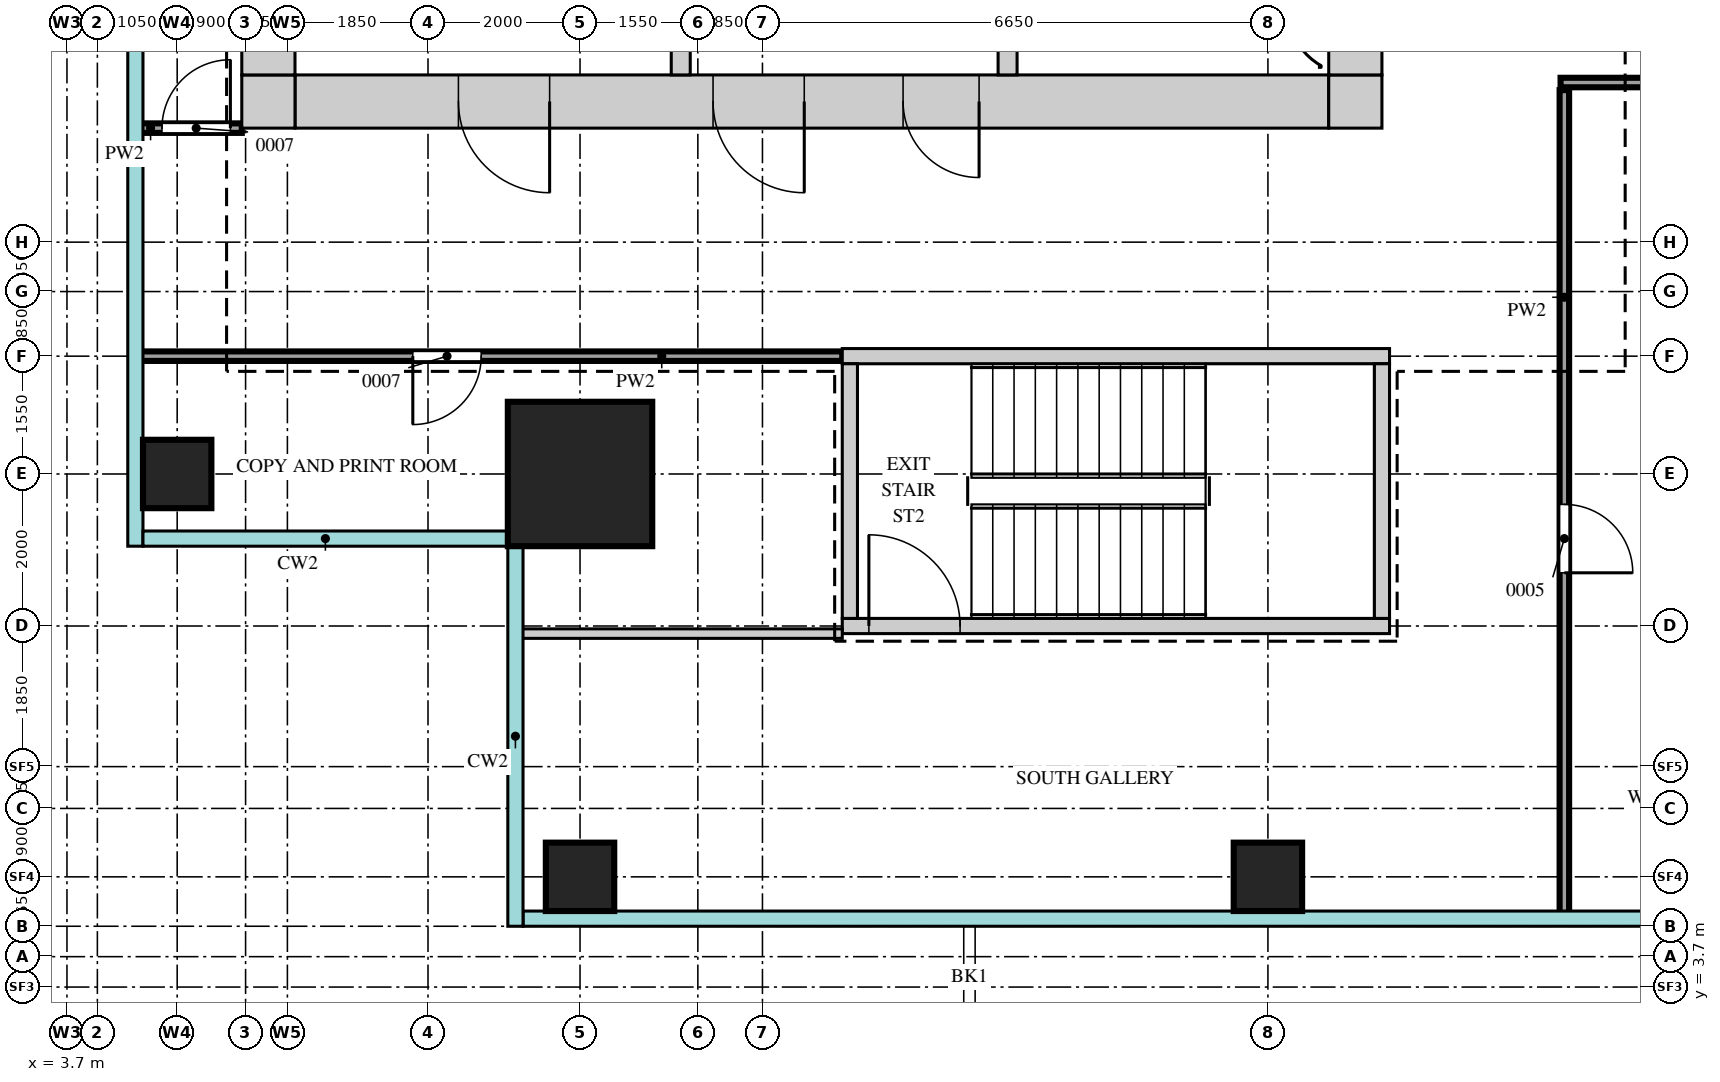
"""IFC4 building model, lengths in metres.
Left out: names, types, materials, properties, quantities, classifications, styles, units other than length and angle.
Written with IfcOpenShell. Run it as: python <this file> out.ifc"""

import sys

from ifc_helpers import new_model, si_unit, direction, frame, frame_2d, origin, origin_2d, place, context, subcontext, project, spatial, rectangle, extrude, source, transform, mapped, element, fill, save


model = new_model("IFC4")
c1 = context("Model", 3, precision=1e-05, world=origin(), true_north=direction((0.0, 1.0)))
c2 = subcontext(c1, "Body", "Model", "MODEL_VIEW")
j1 = project(units=[si_unit("LENGTHUNIT", "METRE"), si_unit("PLANEANGLEUNIT", "RADIAN")], contexts=[c1])
p1 = place(None, origin())
s1 = spatial("IfcSite", under=j1, at=p1, CompositionType="ELEMENT")
p2 = place(p1, origin())
s2 = spatial("IfcBuilding", under=s1, at=p2, CompositionType="ELEMENT")
p3 = place(p2, frame((0.0, 0.0, 230.2)))
s3 = spatial("IfcBuildingStorey", under=s2, at=p3, CompositionType="ELEMENT", Elevation=230.2)
m1 = source(origin(), c2, "Body", "SweptSolid", [
    extrude(rectangle(XDim=13.6, YDim=0.7, at=frame_2d((6.8, 0.0))), origin(), (0.0, 0.0, 1.0), 3.75),
])
p4 = place(p3, frame((6.7, 15.35, 0.0), z_axis=(0.0, 0.0, 1.0), x_axis=(1.0, 0.0, 0.0)))
e1 = element("IfcWall", 1, at=p4, inside=s3, PredefinedType="SHEAR", context=c2, shape_type="MappedRepresentation", body=[
    mapped(m1, transform((0.0, 0.0, 0.0))),
])
m2 = source(origin(), c2, "Body", "SweptSolid", [
    extrude(rectangle(XDim=1.2, YDim=2.1, at=frame_2d((0.6, 1.05))), frame((0.0, 0.36, 0.0), z_axis=(0.0, -1.0, 0.0), x_axis=(1.0, 0.0, 0.0)), (0.0, 0.0, 1.0), 0.72),
])
p5 = place(p4, frame((5.5, 0.0, 0.0)))
e2 = element("IfcOpeningElement", 2, at=p5, cuts=e1, PredefinedType="OPENING", context=c2, shape_type="MappedRepresentation", body=[
    mapped(m2, transform((0.0, 0.0, 0.0))),
])
p6 = place(p4, frame((2.15, 0.0, 0.0)))
e3 = element("IfcOpeningElement", 3, at=p6, cuts=e1, PredefinedType="OPENING", context=c2, shape_type="MappedRepresentation", body=[
    mapped(m2, transform((0.0, 0.0, 0.0))),
])
m3 = source(origin(), c2, "Body", "SweptSolid", [
    extrude(rectangle(XDim=1.0, YDim=2.1, at=frame_2d((0.5, 1.05))), frame((0.0, 0.36, 0.0), z_axis=(0.0, -1.0, 0.0), x_axis=(1.0, 0.0, 0.0)), (0.0, 0.0, 1.0), 0.72),
])
p7 = place(p4, frame((8.0, 0.0, 0.0)))
e4 = element("IfcOpeningElement", 4, at=p7, cuts=e1, PredefinedType="OPENING", context=c2, shape_type="MappedRepresentation", body=[
    mapped(m3, transform((0.0, 0.0, 0.0))),
])
m4 = source(origin(), c2, "Body", "SweptSolid", [
    extrude(rectangle(XDim=0.7, YDim=0.7, at=frame_2d((0.35, 0.0))), origin(), (0.0, 0.0, 1.0), 3.75),
])
for number, where, z_axis, x_axis in (
    (5, (20.3, 15.35, 0.0), (0.0, 0.0, 1.0), (1.0, 0.0, 0.0)),
    (6, (6.0, 15.35, 0.0), (0.0, 0.0, 1.0), (1.0, 0.0, 0.0)),
):
    element("IfcWall", number, at=place(p3, frame(where, z_axis=z_axis, x_axis=x_axis)), inside=s3, PredefinedType="SHEAR", context=c2, shape_type="MappedRepresentation", body=[
        mapped(m4, transform((0.0, 0.0, 0.0))),
    ])
m5 = source(origin(), c2, "Body", "SweptSolid", [
    extrude(rectangle(XDim=22.6, YDim=0.7, at=frame_2d((11.3, 0.0))), origin(), (0.0, 0.0, 1.0), 3.75),
])
p8 = place(p3, frame((20.65, 15.7, 0.0), z_axis=(0.0, 0.0, 1.0), x_axis=(0.0, 1.0, 0.0)))
e7 = element("IfcWall", 7, at=p8, inside=s3, PredefinedType="SHEAR", context=c2, shape_type="MappedRepresentation", body=[
    mapped(m5, transform((0.0, 0.0, 0.0))),
])
m6 = source(origin(), c2, "Body", "SweptSolid", [
    extrude(rectangle(XDim=1.8, YDim=2.1, at=frame_2d((0.9, 1.05))), frame((0.0, 0.36, 0.0), z_axis=(0.0, -1.0, 0.0), x_axis=(1.0, 0.0, 0.0)), (0.0, 0.0, 1.0), 0.72),
])
p9 = place(p8, frame((10.8, 0.0, 0.0)))
e8 = element("IfcOpeningElement", 8, at=p9, cuts=e7, PredefinedType="OPENING", context=c2, shape_type="MappedRepresentation", body=[
    mapped(m6, transform((0.0, 0.0, 0.0))),
])
m7 = source(origin(), c2, "Body", "SweptSolid", [
    extrude(rectangle(XDim=0.9, YDim=2.1, at=frame_2d((0.45, 1.05))), frame((0.0, 0.36, 0.0), z_axis=(0.0, -1.0, 0.0), x_axis=(1.0, 0.0, 0.0)), (0.0, 0.0, 1.0), 0.72),
])
p10 = place(p8, frame((0.45, 0.0, 0.0)))
e9 = element("IfcOpeningElement", 9, at=p10, cuts=e7, PredefinedType="OPENING", context=c2, shape_type="MappedRepresentation", body=[
    mapped(m7, transform((0.0, 0.0, 0.0))),
])
p11 = place(p8, frame((2.9, 0.0, 0.0)))
e10 = element("IfcOpeningElement", 10, at=p11, cuts=e7, PredefinedType="OPENING", context=c2, shape_type="MappedRepresentation", body=[
    mapped(m7, transform((0.0, 0.0, 0.0))),
])
p12 = place(p8, frame((5.65, 0.0, 0.0)))
e11 = element("IfcOpeningElement", 11, at=p12, cuts=e7, PredefinedType="OPENING", context=c2, shape_type="MappedRepresentation", body=[
    mapped(m7, transform((0.0, 0.0, 0.0))),
])
p13 = place(p3, frame((6.35, 15.7, 0.0), z_axis=(0.0, 0.0, 1.0), x_axis=(0.0, 1.0, 0.0)))
e12 = element("IfcWall", 12, at=p13, inside=s3, PredefinedType="SHEAR", context=c2, shape_type="MappedRepresentation", body=[
    mapped(m5, transform((0.0, 0.0, 0.0))),
])
m8 = source(origin(), c2, "Body", "SweptSolid", [
    extrude(rectangle(XDim=7.2, YDim=0.2, at=frame_2d((3.6, 0.0))), origin(), (0.0, 0.0, 1.0), 3.75),
])
p14 = place(p3, frame((13.9, 12.0, 0.0), z_axis=(0.0, 0.0, 1.0), x_axis=(1.0, 0.0, 0.0)))
e13 = element("IfcWall", 13, at=p14, inside=s3, PredefinedType="SHEAR", context=c2, shape_type="MappedRepresentation", body=[
    mapped(m8, transform((0.0, 0.0, 0.0))),
])
p15 = place(p3, frame((13.9, 8.45, 0.0), z_axis=(0.0, 0.0, 1.0), x_axis=(1.0, 0.0, 0.0)))
e14 = element("IfcWall", 14, at=p15, inside=s3, PredefinedType="SHEAR", context=c2, shape_type="MappedRepresentation", body=[
    mapped(m8, transform((0.0, 0.0, 0.0))),
])
m9 = source(origin(), c2, "Body", "SweptSolid", [
    extrude(rectangle(XDim=1.2, YDim=2.1, at=frame_2d((0.6, 1.05))), frame((0.0, 0.11, 0.0), z_axis=(0.0, -1.0, 0.0), x_axis=(1.0, 0.0, 0.0)), (0.0, 0.0, 1.0), 0.22),
])
p16 = place(p15, frame((0.35, 0.0, 0.0)))
e15 = element("IfcOpeningElement", 15, at=p16, cuts=e14, PredefinedType="OPENING", context=c2, shape_type="MappedRepresentation", body=[
    mapped(m9, transform((0.0, 0.0, 0.0))),
])
m10 = source(origin(), c2, "Body", "SweptSolid", [
    extrude(rectangle(XDim=3.35, YDim=0.2, at=frame_2d((1.675, 0.0))), origin(), (0.0, 0.0, 1.0), 3.75),
])
for number, where, z_axis, x_axis in (
    (16, (21.0, 8.55, 0.0), (0.0, 0.0, 1.0), (0.0, 1.0, 0.0)),
    (17, (14.0, 8.55, 0.0), (0.0, 0.0, 1.0), (0.0, 1.0, 0.0)),
):
    element("IfcWall", number, at=place(p3, frame(where, z_axis=z_axis, x_axis=x_axis)), inside=s3, PredefinedType="SHEAR", context=c2, shape_type="MappedRepresentation", body=[
        mapped(m10, transform((0.0, 0.0, 0.0))),
    ])
m11 = source(origin(), c2, "Body", "SweptSolid", [
    extrude(rectangle(XDim=3.5, YDim=0.25, at=frame_2d((1.75, 0.0))), origin(), (0.0, 0.0, 1.0), 3.75),
])
for number, where, z_axis, x_axis in (
    (18, (16.075, 15.7, 0.0), (0.0, 0.0, 1.0), (0.0, 1.0, 0.0)),
    (19, (11.775, 15.7, 0.0), (0.0, 0.0, 1.0), (0.0, 1.0, 0.0)),
):
    element("IfcWall", number, at=place(p3, frame(where, z_axis=z_axis, x_axis=x_axis)), inside=s3, PredefinedType="STANDARD", context=c2, shape_type="MappedRepresentation", body=[
        mapped(m11, transform((0.0, 0.0, 0.0))),
    ])
m12 = source(origin(), c2, "Body", "SweptSolid", [
    extrude(rectangle(XDim=1.9, YDim=1.9, at=origin_2d()), origin(), (0.0, 0.0, 1.0), 4.0),
])
p17 = place(p3, frame((10.45, 10.45, 0.0), z_axis=(0.0, 0.0, 1.0), x_axis=(1.0, 0.0, 0.0)))
e20 = element("IfcColumn", 20, at=p17, inside=s3, PredefinedType="COLUMN", context=c2, shape_type="MappedRepresentation", body=[
    mapped(m12, transform((0.0, 0.0, 0.0))),
])
m13 = source(origin(), c2, "Body", "SweptSolid", [
    extrude(rectangle(XDim=0.9, YDim=0.9, at=origin_2d()), origin(), (0.0, 0.0, 1.0), 3.75),
])
for number, where, z_axis, x_axis in (
    (21, (10.45, 5.15, 0.0), (0.0, 0.0, 1.0), (1.0, 0.0, 0.0)),
    (22, (19.5, 5.15, 0.0), (0.0, 0.0, 1.0), (1.0, 0.0, 0.0)),
    (23, (5.15, 10.45, 0.0), (0.0, 0.0, 1.0), (1.0, 0.0, 0.0)),
):
    element("IfcColumn", number, at=place(p3, frame(where, z_axis=z_axis, x_axis=x_axis)), inside=s3, PredefinedType="COLUMN", context=c2, shape_type="MappedRepresentation", body=[
        mapped(m13, transform((0.0, 0.0, 0.0))),
    ])
m14 = source(origin(), c2, "Body", "SweptSolid", [
    extrude(rectangle(XDim=10.85, YDim=0.125, at=frame_2d((5.425, 0.0))), origin(), (0.0, 0.0, 1.0), 3.8),
])
p18 = place(p3, frame((23.4, 4.65, 0.0), z_axis=(0.0, 0.0, 1.0), x_axis=(0.0, 1.0, 0.0)))
e24 = element("IfcWall", 24, at=p18, inside=s3, PredefinedType="PARTITIONING", context=c2, shape_type="MappedRepresentation", body=[
    mapped(m14, transform((0.0, 0.0, 0.0))),
])
m15 = source(origin(), c2, "Body", "SweptSolid", [
    extrude(rectangle(XDim=0.9, YDim=2.1, at=frame_2d((0.45, 1.05))), frame((0.0, 0.073, 0.0), z_axis=(0.0, -1.0, 0.0), x_axis=(1.0, 0.0, 0.0)), (0.0, 0.0, 1.0), 0.145),
])
p19 = place(p18, frame((4.5, 0.0, 0.0)))
e25 = element("IfcOpeningElement", 25, at=p19, cuts=e24, PredefinedType="OPENING", context=c2, shape_type="MappedRepresentation", body=[
    mapped(m15, transform((0.0, 0.0, 0.0))),
])
m16 = source(origin(), c2, "Body", "SweptSolid", [
    extrude(rectangle(XDim=4.25, YDim=0.125, at=frame_2d((2.125, 0.0))), origin(), (0.0, 0.0, 1.0), 3.8),
])
p20 = place(p3, frame((9.65, 8.35, 0.0), z_axis=(0.0, 0.0, 1.0), x_axis=(1.0, 0.0, 0.0)))
e26 = element("IfcWall", 26, at=p20, inside=s3, PredefinedType="PARTITIONING", context=c2, shape_type="MappedRepresentation", body=[
    mapped(m16, transform((0.0, 0.0, 0.0))),
])
m17 = source(origin(), c2, "Body", "SweptSolid", [
    extrude(rectangle(XDim=9.25, YDim=0.125, at=frame_2d((4.625, 0.0))), origin(), (0.0, 0.0, 1.0), 3.8),
])
p21 = place(p3, frame((4.65, 12.0, 0.0), z_axis=(0.0, 0.0, 1.0), x_axis=(1.0, 0.0, 0.0)))
e27 = element("IfcWall", 27, at=p21, inside=s3, PredefinedType="PARTITIONING", context=c2, shape_type="MappedRepresentation", body=[
    mapped(m17, transform((0.0, 0.0, 0.0))),
])
p22 = place(p21, frame((3.6, 0.0, 0.0)))
e28 = element("IfcOpeningElement", 28, at=p22, cuts=e27, PredefinedType="OPENING", context=c2, shape_type="MappedRepresentation", body=[
    mapped(m15, transform((0.0, 0.0, 0.0))),
])
m18 = source(origin(), c2, "Body", "SweptSolid", [
    extrude(rectangle(XDim=1.35, YDim=0.125, at=frame_2d((0.675, 0.0))), origin(), (0.0, 0.0, 1.0), 3.8),
])
p23 = place(p3, frame((4.65, 15.0, 0.0), z_axis=(0.0, 0.0, 1.0), x_axis=(1.0, 0.0, 0.0)))
e29 = element("IfcWall", 29, at=p23, inside=s3, PredefinedType="PARTITIONING", context=c2, shape_type="MappedRepresentation", body=[
    mapped(m18, transform((0.0, 0.0, 0.0))),
])
p24 = place(p23, frame((0.3, 0.0, 0.0)))
e30 = element("IfcOpeningElement", 30, at=p24, cuts=e29, PredefinedType="OPENING", context=c2, shape_type="MappedRepresentation", body=[
    mapped(m15, transform((0.0, 0.0, 0.0))),
])
m19 = source(origin(), c2, "Body", "SweptSolid", [
    extrude(rectangle(XDim=26.0, YDim=0.125, at=frame_2d((13.0, 0.0))), origin(), (0.0, 0.0, 1.0), 3.8),
])
p25 = place(p3, frame((23.35, 15.6, 0.0), z_axis=(0.0, 0.0, 1.0), x_axis=(1.0, 0.0, 0.0)))
e31 = element("IfcWall", 31, at=p25, inside=s3, PredefinedType="PARTITIONING", context=c2, shape_type="MappedRepresentation", body=[
    mapped(m19, transform((0.0, 0.0, 0.0))),
])
p26 = place(p25, frame((4.05, 0.0, 0.0)))
e32 = element("IfcOpeningElement", 32, at=p26, cuts=e31, PredefinedType="OPENING", context=c2, shape_type="MappedRepresentation", body=[
    mapped(m15, transform((0.0, 0.0, 0.0))),
])
m20 = source(origin(), c2, "Body", "SweptSolid", [
    extrude(rectangle(XDim=1.0, YDim=2.1, at=frame_2d((0.5, 1.05))), frame((0.0, 0.073, 0.0), z_axis=(0.0, -1.0, 0.0), x_axis=(1.0, 0.0, 0.0)), (0.0, 0.0, 1.0), 0.145),
])
p27 = place(p25, frame((6.85, 0.0, 0.0)))
e33 = element("IfcOpeningElement", 33, at=p27, cuts=e31, PredefinedType="OPENING", context=c2, shape_type="MappedRepresentation", body=[
    mapped(m20, transform((0.0, 0.0, 0.0))),
])
p28 = place(p25, frame((9.25, 0.0, 0.0)))
e34 = element("IfcOpeningElement", 34, at=p28, cuts=e31, PredefinedType="OPENING", context=c2, shape_type="MappedRepresentation", body=[
    mapped(m15, transform((0.0, 0.0, 0.0))),
])
p29 = place(p25, frame((15.1, 0.0, 0.0)))
e35 = element("IfcOpeningElement", 35, at=p29, cuts=e31, PredefinedType="OPENING", context=c2, shape_type="MappedRepresentation", body=[
    mapped(m15, transform((0.0, 0.0, 0.0))),
])
p30 = place(p25, frame((22.6, 0.0, 0.0)))
e36 = element("IfcOpeningElement", 36, at=p30, cuts=e31, PredefinedType="OPENING", context=c2, shape_type="MappedRepresentation", body=[
    mapped(m15, transform((0.0, 0.0, 0.0))),
])
m21 = source(origin(), c2, "Body", "SweptSolid", [
    extrude(rectangle(XDim=1.2, YDim=2.1, at=frame_2d((0.6, 1.05))), frame((0.0, 0.3, 0.0), z_axis=(0.0, -1.0, 0.0), x_axis=(1.0, 0.0, 0.0)), (0.0, 0.0, 1.0), 0.6),
])
p31 = place(p5, origin())
e37 = element("IfcDoor", 37, at=p31, inside=s3, OperationType="SINGLE_SWING_RIGHT", PredefinedType="DOOR", context=c2, shape_type="MappedRepresentation", body=[
    mapped(m21, transform((0.0, 0.0, 0.0))),
])
fill(e2, e37)
p32 = place(p6, origin())
e38 = element("IfcDoor", 38, at=p32, inside=s3, OperationType="SINGLE_SWING_RIGHT", PredefinedType="DOOR", context=c2, shape_type="MappedRepresentation", body=[
    mapped(m21, transform((0.0, 0.0, 0.0))),
])
fill(e3, e38)
m22 = source(origin(), c2, "Body", "SweptSolid", [
    extrude(rectangle(XDim=1.0, YDim=2.1, at=frame_2d((0.5, 1.05))), frame((0.0, 0.3, 0.0), z_axis=(0.0, -1.0, 0.0), x_axis=(1.0, 0.0, 0.0)), (0.0, 0.0, 1.0), 0.6),
])
p33 = place(p7, origin())
e39 = element("IfcDoor", 39, at=p33, inside=s3, OperationType="SINGLE_SWING_RIGHT", PredefinedType="DOOR", context=c2, shape_type="MappedRepresentation", body=[
    mapped(m22, transform((0.0, 0.0, 0.0))),
])
fill(e4, e39)
m23 = source(origin(), c2, "Body", "SweptSolid", [
    extrude(rectangle(XDim=0.9, YDim=2.1, at=frame_2d((0.45, 1.05))), frame((0.0, 0.025, 0.0), z_axis=(0.0, -1.0, 0.0), x_axis=(1.0, 0.0, 0.0)), (0.0, 0.0, 1.0), 0.05),
])
p34 = place(p24, origin())
e40 = element("IfcDoor", 40, at=p34, inside=s3, OperationType="SINGLE_SWING_LEFT", PredefinedType="DOOR", context=c2, shape_type="MappedRepresentation", body=[
    mapped(m23, transform((0.0, 0.0, 0.0))),
])
fill(e30, e40)
p35 = place(p22, origin())
e41 = element("IfcDoor", 41, at=p35, inside=s3, OperationType="SINGLE_SWING_LEFT", PredefinedType="DOOR", context=c2, shape_type="MappedRepresentation", body=[
    mapped(m23, transform((0.0, 0.0, 0.0))),
])
fill(e28, e41)
p36 = place(p19, origin())
e42 = element("IfcDoor", 42, at=p36, inside=s3, OperationType="SINGLE_SWING_LEFT", PredefinedType="DOOR", context=c2, shape_type="MappedRepresentation", body=[
    mapped(m23, transform((0.0, 0.0, 0.0))),
])
fill(e25, e42)
m24 = source(origin(), c2, "Body", "SweptSolid", [
    extrude(rectangle(XDim=1.2, YDim=2.1, at=frame_2d((0.6, 1.05))), frame((0.0, 0.025, 0.0), z_axis=(0.0, -1.0, 0.0), x_axis=(1.0, 0.0, 0.0)), (0.0, 0.0, 1.0), 0.05),
])
p37 = place(p16, origin())
e43 = element("IfcDoor", 43, at=p37, inside=s3, OperationType="SINGLE_SWING_RIGHT", PredefinedType="DOOR", context=c2, shape_type="MappedRepresentation", body=[
    mapped(m24, transform((0.0, 0.0, 0.0))),
])
fill(e15, e43)
save(model, sys.argv[1])
